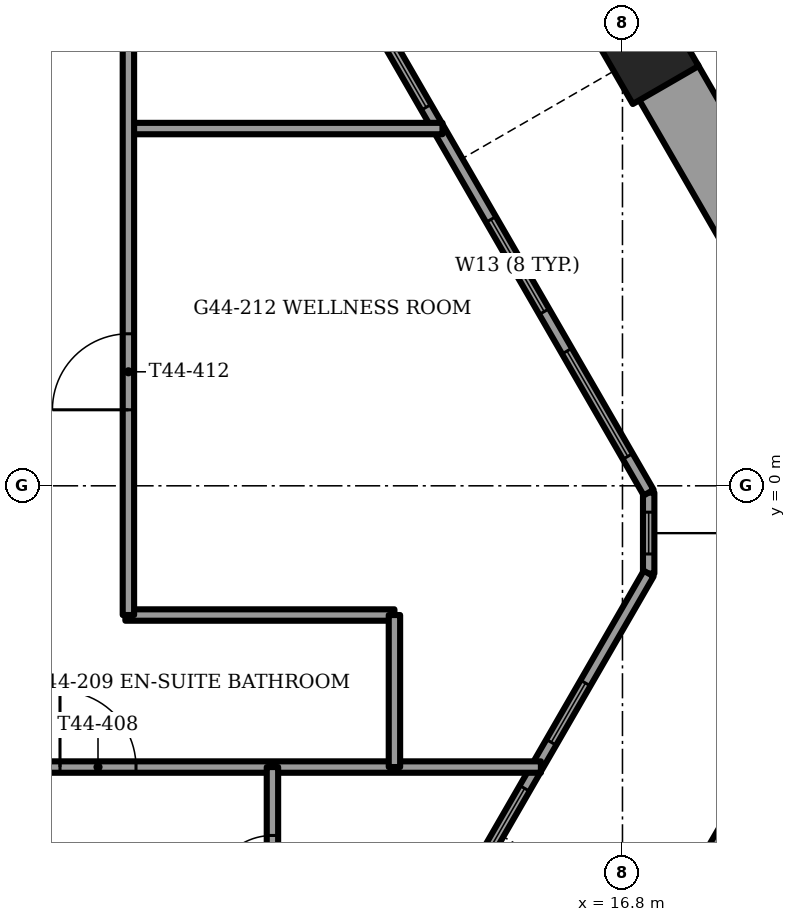
"""IFC4 building model, lengths in metres.
Left out: names, types, materials, properties, quantities, classifications, styles, units other than length and angle.
Written with IfcOpenShell. Run it as: python <this file> out.ifc"""

import sys

from ifc_helpers import new_model, si_unit, direction, frame, frame_2d, origin, origin_2d, place, context, subcontext, project, spatial, rectangle, extrude, element, fill, save


model = new_model("IFC4")
c1 = context("Model", 3, precision=1e-05, world=origin(), true_north=direction((0.0, 1.0)))
c2 = subcontext(c1, "Body", "Model", "MODEL_VIEW")
j1 = project(units=[si_unit("LENGTHUNIT", "METRE"), si_unit("PLANEANGLEUNIT", "RADIAN")], contexts=[c1])
p1 = place(None, origin())
s1 = spatial("IfcSite", under=j1, at=p1, CompositionType="ELEMENT")
p2 = place(p1, origin())
s2 = spatial("IfcBuilding", under=s1, at=p2, CompositionType="ELEMENT")
p3 = place(p2, frame((0.0, 0.0, 179.5)))
s3 = spatial("IfcBuildingStorey", under=s2, at=p3, CompositionType="ELEMENT", Elevation=179.5)
p4 = place(p3, frame((17.119, 5.706, -1.2), z_axis=(0.0, 0.0, 1.0), x_axis=(0.5, -0.866025403784, 0.0)))
e1 = element("IfcColumn", 1, at=p4, inside=s3, PredefinedType="COLUMN", context=c2, shape_type="SweptSolid", body=[
    extrude(rectangle(XDim=1.0, YDim=1.0, at=origin_2d()), origin(), (0.0, 0.0, 1.0), 3.75),
])
p5 = place(p3, frame((17.936, -5.635, 0.0), z_axis=(0.0, 0.0, 1.0), x_axis=(0.500023253097, 0.866011978186, 0.0)))
e2 = element("IfcWall", 2, at=p5, inside=s3, PredefinedType="PARAPET", context=c2, shape_type="SweptSolid", body=[
    extrude(rectangle(XDim=5.246, YDim=0.9, at=frame_2d((2.623, 0.0))), origin(), (0.0, 0.0, 1.0), 1.1),
])
p6 = place(p3, frame((20.559, -0.152, 0.0), z_axis=(0.0, 0.0, 1.0), x_axis=(-0.500017688138, 0.866015191293, 0.0)))
e3 = element("IfcWall", 3, at=p6, inside=s3, PredefinedType="PARAPET", context=c2, shape_type="SweptSolid", body=[
    extrude(rectangle(XDim=6.323, YDim=0.9, at=frame_2d((3.162, 0.0))), origin(), (0.0, 0.0, 1.0), 1.1),
])
p7 = place(p3, frame((9.572, -14.271, 0.0), z_axis=(0.0, 0.0, 1.0), x_axis=(0.500005248668, 0.866022373443, 0.0)))
e4 = element("IfcWall", 4, at=p7, inside=s3, PredefinedType="SOLIDWALL", context=c2, shape_type="SweptSolid", body=[
    extrude(rectangle(XDim=15.145, YDim=0.15, at=frame_2d((7.573, 0.0))), origin(), (0.0, 0.0, 1.0), 3.45),
])
p8 = place(p7, frame((1.573, 0.0, 0.15)))
e5 = element("IfcOpeningElement", 5, at=p8, cuts=e4, PredefinedType="OPENING", context=c2, shape_type="SweptSolid", body=[
    extrude(rectangle(XDim=1.6, YDim=2.85, at=frame_2d((0.8, 1.425))), frame((0.0, 0.075, 0.0), z_axis=(0.0, -1.0, 0.0), x_axis=(1.0, 0.0, 0.0)), (0.0, 0.0, 1.0), 0.15),
])
p9 = place(p7, frame((3.773, 0.0, 0.0)))
e6 = element("IfcOpeningElement", 6, at=p9, cuts=e4, PredefinedType="OPENING", context=c2, shape_type="SweptSolid", body=[
    extrude(rectangle(XDim=1.4, YDim=2.4, at=frame_2d((0.7, 1.2))), frame((0.0, 0.075, 0.0), z_axis=(0.0, -1.0, 0.0), x_axis=(1.0, 0.0, 0.0)), (0.0, 0.0, 1.0), 0.15),
])
p10 = place(p7, frame((5.773, 0.0, 0.15)))
e7 = element("IfcOpeningElement", 7, at=p10, cuts=e4, PredefinedType="OPENING", context=c2, shape_type="SweptSolid", body=[
    extrude(rectangle(XDim=0.9, YDim=2.85, at=frame_2d((0.45, 1.425))), frame((0.0, 0.075, 0.0), z_axis=(0.0, -1.0, 0.0), x_axis=(1.0, 0.0, 0.0)), (0.0, 0.0, 1.0), 0.15),
])
p11 = place(p7, frame((6.93, 0.0, 0.0)))
e8 = element("IfcOpeningElement", 8, at=p11, cuts=e4, PredefinedType="OPENING", context=c2, shape_type="SweptSolid", body=[
    extrude(rectangle(XDim=1.4, YDim=2.4, at=frame_2d((0.7, 1.2))), frame((0.0, 0.075, 0.0), z_axis=(0.0, -1.0, 0.0), x_axis=(1.0, 0.0, 0.0)), (0.0, 0.0, 1.0), 0.15),
])
p12 = place(p7, frame((12.582, 0.0, 0.15)))
e9 = element("IfcOpeningElement", 9, at=p12, cuts=e4, PredefinedType="OPENING", context=c2, shape_type="SweptSolid", body=[
    extrude(rectangle(XDim=0.9, YDim=2.85, at=frame_2d((0.45, 1.425))), frame((0.0, 0.075, 0.0), z_axis=(0.0, -1.0, 0.0), x_axis=(1.0, 0.0, 0.0)), (0.0, 0.0, 1.0), 0.15),
])
p13 = place(p7, frame((10.482, 0.0, 0.15)))
e10 = element("IfcOpeningElement", 10, at=p13, cuts=e4, PredefinedType="OPENING", context=c2, shape_type="SweptSolid", body=[
    extrude(rectangle(XDim=1.4, YDim=2.85, at=frame_2d((0.7, 1.425))), frame((0.0, 0.075, 0.0), z_axis=(0.0, -1.0, 0.0), x_axis=(1.0, 0.0, 0.0)), (0.0, 0.0, 1.0), 0.15),
])
p14 = place(p3, frame((17.145, -0.089, 0.0), z_axis=(0.0, 0.0, 1.0), x_axis=(-0.499999728453, 0.866025560562, 0.0)))
e11 = element("IfcWall", 11, at=p14, inside=s3, PredefinedType="SOLIDWALL", context=c2, shape_type="SweptSolid", body=[
    extrude(rectangle(XDim=20.071, YDim=0.15, at=frame_2d((10.035, 0.0))), origin(), (0.0, 0.0, 1.0), 3.45),
])
p15 = place(p14, frame((0.55, 0.0, 0.15)))
e12 = element("IfcOpeningElement", 12, at=p15, cuts=e11, PredefinedType="OPENING", context=c2, shape_type="SweptSolid", body=[
    extrude(rectangle(XDim=1.6, YDim=2.85, at=frame_2d((0.8, 1.425))), frame((0.0, 0.075, 0.0), z_axis=(0.0, -1.0, 0.0), x_axis=(1.0, 0.0, 0.0)), (0.0, 0.0, 1.0), 0.15),
])
p16 = place(p14, frame((2.75, 0.0, 0.15)))
e13 = element("IfcOpeningElement", 13, at=p16, cuts=e11, PredefinedType="OPENING", context=c2, shape_type="SweptSolid", body=[
    extrude(rectangle(XDim=1.4, YDim=2.85, at=frame_2d((0.7, 1.425))), frame((0.0, 0.075, 0.0), z_axis=(0.0, -1.0, 0.0), x_axis=(1.0, 0.0, 0.0)), (0.0, 0.0, 1.0), 0.15),
])
p17 = place(p14, frame((5.854, 0.0, 0.15)))
e14 = element("IfcOpeningElement", 14, at=p17, cuts=e11, PredefinedType="OPENING", context=c2, shape_type="SweptSolid", body=[
    extrude(rectangle(XDim=0.9, YDim=2.85, at=frame_2d((0.45, 1.425))), frame((0.0, 0.075, 0.0), z_axis=(0.0, -1.0, 0.0), x_axis=(1.0, 0.0, 0.0)), (0.0, 0.0, 1.0), 0.15),
])
p18 = place(p14, frame((6.95, 0.0, 0.15)))
e15 = element("IfcOpeningElement", 15, at=p18, cuts=e11, PredefinedType="OPENING", context=c2, shape_type="SweptSolid", body=[
    extrude(rectangle(XDim=1.4, YDim=2.85, at=frame_2d((0.7, 1.425))), frame((0.0, 0.075, 0.0), z_axis=(0.0, -1.0, 0.0), x_axis=(1.0, 0.0, 0.0)), (0.0, 0.0, 1.0), 0.15),
])
p19 = place(p14, frame((8.95, 0.0, 0.15)))
e16 = element("IfcOpeningElement", 16, at=p19, cuts=e11, PredefinedType="OPENING", context=c2, shape_type="SweptSolid", body=[
    extrude(rectangle(XDim=1.6, YDim=2.85, at=frame_2d((0.8, 1.425))), frame((0.0, 0.075, 0.0), z_axis=(0.0, -1.0, 0.0), x_axis=(1.0, 0.0, 0.0)), (0.0, 0.0, 1.0), 0.15),
])
p20 = place(p14, frame((11.15, 0.0, 0.15)))
e17 = element("IfcOpeningElement", 17, at=p20, cuts=e11, PredefinedType="OPENING", context=c2, shape_type="SweptSolid", body=[
    extrude(rectangle(XDim=1.4, YDim=2.85, at=frame_2d((0.7, 1.425))), frame((0.0, 0.075, 0.0), z_axis=(0.0, -1.0, 0.0), x_axis=(1.0, 0.0, 0.0)), (0.0, 0.0, 1.0), 0.15),
])
p21 = place(p14, frame((14.803, 0.0, 0.15)))
e18 = element("IfcOpeningElement", 18, at=p21, cuts=e11, PredefinedType="OPENING", context=c2, shape_type="SweptSolid", body=[
    extrude(rectangle(XDim=1.6, YDim=2.85, at=frame_2d((0.8, 1.425))), frame((0.0, 0.075, 0.0), z_axis=(0.0, -1.0, 0.0), x_axis=(1.0, 0.0, 0.0)), (0.0, 0.0, 1.0), 0.15),
])
p22 = place(p14, frame((18.019, 0.0, 0.15)))
e19 = element("IfcOpeningElement", 19, at=p22, cuts=e11, PredefinedType="OPENING", context=c2, shape_type="SweptSolid", body=[
    extrude(rectangle(XDim=1.6, YDim=2.73, at=frame_2d((0.8, 1.365))), frame((0.0, 0.075, 0.0), z_axis=(0.0, -1.0, 0.0), x_axis=(1.0, 0.0, 0.0)), (0.0, 0.0, 1.0), 0.15),
])
p23 = place(p3, frame((17.145, -1.154, 0.0), z_axis=(0.0, 0.0, 1.0), x_axis=(0.0, 1.0, 0.0)))
e20 = element("IfcWall", 20, at=p23, inside=s3, PredefinedType="SOLIDWALL", context=c2, shape_type="SweptSolid", body=[
    extrude(rectangle(XDim=1.065, YDim=0.15, at=frame_2d((0.532, 0.0))), origin(), (0.0, 0.0, 1.0), 3.45),
])
p24 = place(p23, frame((0.258, 0.0, 0.15)))
e21 = element("IfcOpeningElement", 21, at=p24, cuts=e20, PredefinedType="OPENING", context=c2, shape_type="SweptSolid", body=[
    extrude(rectangle(XDim=0.55, YDim=2.85, at=frame_2d((0.275, 1.425))), frame((0.0, 0.075, 0.0), z_axis=(0.0, -1.0, 0.0), x_axis=(1.0, 0.0, 0.0)), (0.0, 0.0, 1.0), 0.15),
])
p25 = place(p3, frame((9.16, -3.7, 0.0), z_axis=(0.0, 0.0, 1.0), x_axis=(1.0, 0.0, 0.0)))
e22 = element("IfcWall", 22, at=p25, inside=s3, PredefinedType="PARTITIONING", context=c2, shape_type="SweptSolid", body=[
    extrude(rectangle(XDim=6.567, YDim=0.15, at=frame_2d((3.284, 0.0))), origin(), (0.0, 0.0, 1.0), 3.45),
])
p26 = place(p25, frame((0.24, 0.0, 0.0)))
e23 = element("IfcOpeningElement", 23, at=p26, cuts=e22, PredefinedType="OPENING", context=c2, shape_type="SweptSolid", body=[
    extrude(rectangle(XDim=1.0, YDim=2.1, at=frame_2d((0.5, 1.05))), frame((0.0, 0.075, 0.0), z_axis=(0.0, -1.0, 0.0), x_axis=(1.0, 0.0, 0.0)), (0.0, 0.0, 1.0), 0.15),
])
p27 = place(p3, frame((10.26, -1.7, 0.0), z_axis=(0.0, 0.0, 1.0), x_axis=(1.0, 0.0, 0.0)))
e24 = element("IfcWall", 24, at=p27, inside=s3, PredefinedType="PARTITIONING", context=c2, shape_type="SweptSolid", body=[
    extrude(rectangle(XDim=3.54, YDim=0.15, at=frame_2d((1.77, 0.0))), origin(), (0.0, 0.0, 1.0), 3.45),
])
p28 = place(p3, frame((10.3, 4.7, 0.0), z_axis=(0.0, 0.0, 1.0), x_axis=(1.0, 0.0, 0.0)))
e25 = element("IfcWall", 25, at=p28, inside=s3, PredefinedType="PARTITIONING", context=c2, shape_type="SweptSolid", body=[
    extrude(rectangle(XDim=4.132, YDim=0.15, at=frame_2d((2.066, 0.0))), origin(), (0.0, 0.0, 1.0), 3.45),
])
p29 = place(p3, frame((13.8, -3.7, 0.0), z_axis=(0.0, 0.0, 1.0), x_axis=(0.0, 1.0, 0.0)))
e26 = element("IfcWall", 26, at=p29, inside=s3, PredefinedType="PARTITIONING", context=c2, shape_type="SweptSolid", body=[
    extrude(rectangle(XDim=2.0, YDim=0.15, at=frame_2d((1.0, 0.0))), origin(), (0.0, 0.0, 1.0), 3.45),
])
p30 = place(p3, frame((12.195, -6.3, 0.0), z_axis=(0.0, 0.0, 1.0), x_axis=(0.0, 1.0, 0.0)))
e27 = element("IfcWall", 27, at=p30, inside=s3, PredefinedType="PARTITIONING", context=c2, shape_type="SweptSolid", body=[
    extrude(rectangle(XDim=2.6, YDim=0.15, at=frame_2d((1.3, 0.0))), origin(), (0.0, 0.0, 1.0), 3.45),
])
p31 = place(p30, frame((0.9, 0.0, 0.0)))
e28 = element("IfcOpeningElement", 28, at=p31, cuts=e27, PredefinedType="OPENING", context=c2, shape_type="SweptSolid", body=[
    extrude(rectangle(XDim=0.8, YDim=2.1, at=frame_2d((0.4, 1.05))), frame((0.0, 0.075, 0.0), z_axis=(0.0, -1.0, 0.0), x_axis=(1.0, 0.0, 0.0)), (0.0, 0.0, 1.0), 0.15),
])
p32 = place(p3, frame((10.3, -1.7, 0.0), z_axis=(0.0, 0.0, 1.0), x_axis=(0.0, 1.0, 0.0)))
e29 = element("IfcWall", 29, at=p32, inside=s3, PredefinedType="PARTITIONING", context=c2, shape_type="SweptSolid", body=[
    extrude(rectangle(XDim=13.556, YDim=0.15, at=frame_2d((6.778, 0.0))), origin(), (0.0, 0.0, 1.0), 3.45),
])
p33 = place(p32, frame((2.7, 0.0, 0.0)))
e30 = element("IfcOpeningElement", 30, at=p33, cuts=e29, PredefinedType="OPENING", context=c2, shape_type="SweptSolid", body=[
    extrude(rectangle(XDim=1.0, YDim=2.1, at=frame_2d((0.5, 1.05))), frame((0.0, 0.075, 0.0), z_axis=(0.0, -1.0, 0.0), x_axis=(1.0, 0.0, 0.0)), (0.0, 0.0, 1.0), 0.15),
])
p34 = place(p32, frame((9.357, 0.0, 0.0)))
e31 = element("IfcOpeningElement", 31, at=p34, cuts=e29, PredefinedType="OPENING", context=c2, shape_type="SweptSolid", body=[
    extrude(rectangle(XDim=1.0, YDim=2.1, at=frame_2d((0.5, 1.05))), frame((0.0, 0.075, 0.0), z_axis=(0.0, -1.0, 0.0), x_axis=(1.0, 0.0, 0.0)), (0.0, 0.0, 1.0), 0.15),
])
p35 = place(p12, origin())
e32 = element("IfcWindow", 32, at=p35, inside=s3, PartitioningType="SINGLE_PANEL", PredefinedType="WINDOW", context=c2, shape_type="SweptSolid", body=[
    extrude(rectangle(XDim=0.9, YDim=2.85, at=frame_2d((0.45, 1.425))), frame((0.0, 0.03, 0.0), z_axis=(0.0, -1.0, 0.0), x_axis=(1.0, 0.0, 0.0)), (0.0, 0.0, 1.0), 0.06),
])
fill(e9, e32)
p36 = place(p13, origin())
e33 = element("IfcWindow", 33, at=p36, inside=s3, PartitioningType="SINGLE_PANEL", PredefinedType="WINDOW", context=c2, shape_type="SweptSolid", body=[
    extrude(rectangle(XDim=1.4, YDim=2.85, at=frame_2d((0.7, 1.425))), frame((0.0, 0.03, 0.0), z_axis=(0.0, -1.0, 0.0), x_axis=(1.0, 0.0, 0.0)), (0.0, 0.0, 1.0), 0.06),
])
fill(e10, e33)
p37 = place(p15, origin())
e34 = element("IfcWindow", 34, at=p37, inside=s3, PartitioningType="SINGLE_PANEL", PredefinedType="WINDOW", context=c2, shape_type="SweptSolid", body=[
    extrude(rectangle(XDim=1.6, YDim=2.85, at=frame_2d((0.8, 1.425))), frame((0.0, 0.03, 0.0), z_axis=(0.0, -1.0, 0.0), x_axis=(1.0, 0.0, 0.0)), (0.0, 0.0, 1.0), 0.06),
])
fill(e12, e34)
p38 = place(p16, origin())
e35 = element("IfcWindow", 35, at=p38, inside=s3, PartitioningType="SINGLE_PANEL", PredefinedType="WINDOW", context=c2, shape_type="SweptSolid", body=[
    extrude(rectangle(XDim=1.4, YDim=2.85, at=frame_2d((0.7, 1.425))), frame((0.0, 0.03, 0.0), z_axis=(0.0, -1.0, 0.0), x_axis=(1.0, 0.0, 0.0)), (0.0, 0.0, 1.0), 0.06),
])
fill(e13, e35)
p39 = place(p17, origin())
e36 = element("IfcWindow", 36, at=p39, inside=s3, PartitioningType="SINGLE_PANEL", PredefinedType="WINDOW", context=c2, shape_type="SweptSolid", body=[
    extrude(rectangle(XDim=0.9, YDim=2.85, at=frame_2d((0.45, 1.425))), frame((0.0, 0.03, 0.0), z_axis=(0.0, -1.0, 0.0), x_axis=(1.0, 0.0, 0.0)), (0.0, 0.0, 1.0), 0.06),
])
fill(e14, e36)
p40 = place(p24, origin())
e37 = element("IfcWindow", 37, at=p40, inside=s3, PartitioningType="SINGLE_PANEL", PredefinedType="WINDOW", context=c2, shape_type="SweptSolid", body=[
    extrude(rectangle(XDim=0.55, YDim=2.85, at=frame_2d((0.275, 1.425))), frame((0.0, 0.03, 0.0), z_axis=(0.0, -1.0, 0.0), x_axis=(1.0, 0.0, 0.0)), (0.0, 0.0, 1.0), 0.06),
])
fill(e21, e37)
p41 = place(p26, origin())
e38 = element("IfcDoor", 38, at=p41, inside=s3, OperationType="SINGLE_SWING_LEFT", PredefinedType="DOOR", context=c2, shape_type="SweptSolid", body=[
    extrude(rectangle(XDim=1.0, YDim=2.1, at=frame_2d((0.5, 1.05))), frame((0.0, 0.025, 0.0), z_axis=(0.0, -1.0, 0.0), x_axis=(1.0, 0.0, 0.0)), (0.0, 0.0, 1.0), 0.05),
])
fill(e23, e38)
p42 = place(p31, origin())
e39 = element("IfcDoor", 39, at=p42, inside=s3, OperationType="SINGLE_SWING_RIGHT", PredefinedType="DOOR", context=c2, shape_type="SweptSolid", body=[
    extrude(rectangle(XDim=0.8, YDim=2.1, at=frame_2d((0.4, 1.05))), frame((0.0, 0.025, 0.0), z_axis=(0.0, -1.0, 0.0), x_axis=(1.0, 0.0, 0.0)), (0.0, 0.0, 1.0), 0.05),
])
fill(e28, e39)
p43 = place(p33, origin())
e40 = element("IfcDoor", 40, at=p43, inside=s3, OperationType="SINGLE_SWING_LEFT", PredefinedType="DOOR", context=c2, shape_type="SweptSolid", body=[
    extrude(rectangle(XDim=1.0, YDim=2.1, at=frame_2d((0.5, 1.05))), frame((0.0, 0.025, 0.0), z_axis=(0.0, -1.0, 0.0), x_axis=(1.0, 0.0, 0.0)), (0.0, 0.0, 1.0), 0.05),
])
fill(e30, e40)
save(model, sys.argv[1])
